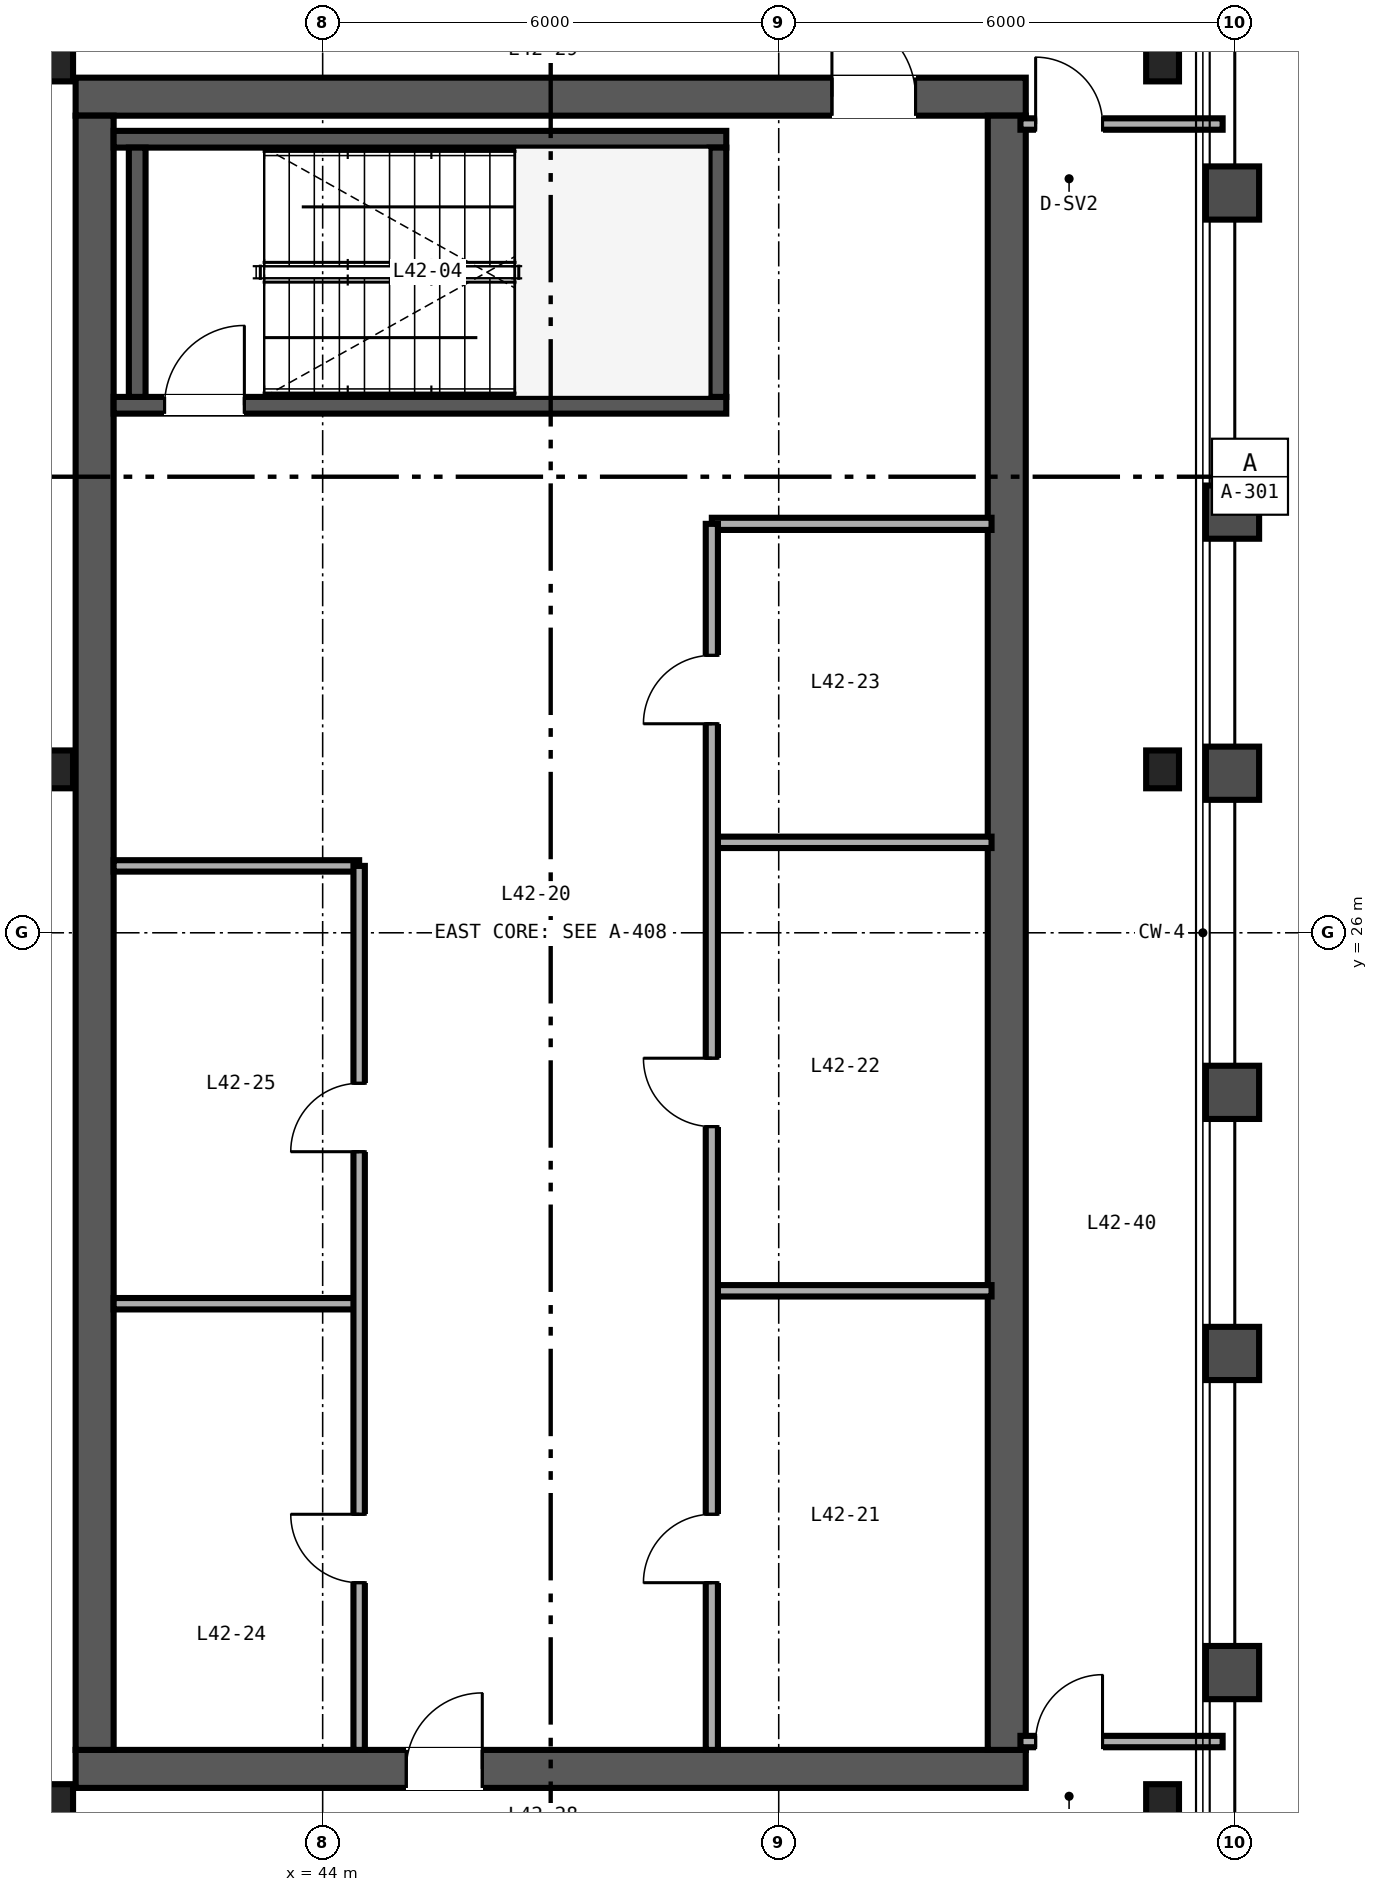
"""IFC4 building model, lengths in metres.
Left out: names, types, materials, properties, quantities, classifications, styles, units other than length and angle.
Written with IfcOpenShell. Run it as: python <this file> out.ifc"""

import sys

from ifc_helpers import new_model, si_unit, direction, frame, frame_2d, origin, origin_2d, place, context, subcontext, project, spatial, rectangle, i_section, extrude, source, transform, mapped, element, fill, save


model = new_model("IFC4")
c1 = context("Model", 3, precision=1e-05, world=origin(), true_north=direction((0.0, 1.0)))
c2 = subcontext(c1, "Body", "Model", "MODEL_VIEW")
j1 = project(units=[si_unit("LENGTHUNIT", "METRE"), si_unit("PLANEANGLEUNIT", "RADIAN")], contexts=[c1])
p1 = place(None, origin())
s1 = spatial("IfcSite", under=j1, at=p1, CompositionType="ELEMENT")
p2 = place(p1, origin())
s2 = spatial("IfcBuilding", under=s1, at=p2, CompositionType="ELEMENT")
p3 = place(p2, frame((0.0, 0.0, 170.4)))
s3 = spatial("IfcBuildingStorey", under=s2, at=p3, CompositionType="ELEMENT", Elevation=170.4)
p4 = place(p3, frame((40.75, 15.0, 0.0), z_axis=(0.0, 0.0, 1.0), x_axis=(1.0, 0.0, 0.0)))
e1 = element("IfcWall", 1, at=p4, inside=s3, PredefinedType="SHEAR", context=c2, shape_type="SweptSolid", body=[
    extrude(rectangle(XDim=12.5, YDim=0.5, at=frame_2d((6.25, 0.0))), origin(), (0.0, 0.0, 1.0), 3.37),
])
p5 = place(p4, frame((4.35, 0.0, 0.0)))
e2 = element("IfcOpeningElement", 2, at=p5, cuts=e1, PredefinedType="OPENING", context=c2, shape_type="SweptSolid", body=[
    extrude(rectangle(XDim=1.0, YDim=2.15, at=frame_2d((0.5, 1.075))), frame((0.0, 0.26, 0.0), z_axis=(0.0, -1.0, 0.0), x_axis=(1.0, 0.0, 0.0)), (0.0, 0.0, 1.0), 0.52),
])
p6 = place(p3, frame((40.75, 37.0, 0.0), z_axis=(0.0, 0.0, 1.0), x_axis=(1.0, 0.0, 0.0)))
e3 = element("IfcWall", 3, at=p6, inside=s3, PredefinedType="SHEAR", context=c2, shape_type="SweptSolid", body=[
    extrude(rectangle(XDim=12.5, YDim=0.5, at=frame_2d((6.25, 0.0))), origin(), (0.0, 0.0, 1.0), 3.37),
])
p7 = place(p6, frame((9.95, 0.0, 0.0)))
e4 = element("IfcOpeningElement", 4, at=p7, cuts=e3, PredefinedType="OPENING", context=c2, shape_type="SweptSolid", body=[
    extrude(rectangle(XDim=1.1, YDim=2.15, at=frame_2d((0.55, 1.075))), frame((0.0, 0.26, 0.0), z_axis=(0.0, -1.0, 0.0), x_axis=(1.0, 0.0, 0.0)), (0.0, 0.0, 1.0), 0.52),
])
for number, where, z_axis, x_axis in (
    (5, (41.0, 15.25, 0.0), (0.0, 0.0, 1.0), (0.0, 1.0, 0.0)),
    (6, (53.0, 15.25, 0.0), (0.0, 0.0, 1.0), (0.0, 1.0, 0.0)),
):
    element("IfcWall", number, at=place(p3, frame(where, z_axis=z_axis, x_axis=x_axis)), inside=s3, PredefinedType="SHEAR", context=c2, shape_type="SweptSolid", body=[
        extrude(rectangle(XDim=21.5, YDim=0.5, at=frame_2d((10.75, 0.0))), origin(), (0.0, 0.0, 1.0), 3.37),
    ])
p8 = place(p3, frame((41.25, 32.94, 0.0), z_axis=(0.0, 0.0, 1.0), x_axis=(1.0, 0.0, 0.0)))
e7 = element("IfcWall", 7, at=p8, inside=s3, PredefinedType="SHEAR", context=c2, shape_type="SweptSolid", body=[
    extrude(rectangle(XDim=8.06, YDim=0.22, at=frame_2d((4.03, 0.0))), origin(), (0.0, 0.0, 1.0), 3.4),
])
p9 = place(p8, frame((0.67, 0.0, 0.0)))
e8 = element("IfcOpeningElement", 8, at=p9, cuts=e7, PredefinedType="OPENING", context=c2, shape_type="SweptSolid", body=[
    extrude(rectangle(XDim=1.05, YDim=2.15, at=frame_2d((0.525, 1.075))), frame((0.0, 0.12, 0.0), z_axis=(0.0, -1.0, 0.0), x_axis=(1.0, 0.0, 0.0)), (0.0, 0.0, 1.0), 0.24),
])
p10 = place(p3, frame((41.25, 36.44, 0.0), z_axis=(0.0, 0.0, 1.0), x_axis=(1.0, 0.0, 0.0)))
e9 = element("IfcWall", 9, at=p10, inside=s3, PredefinedType="SHEAR", context=c2, shape_type="SweptSolid", body=[
    extrude(rectangle(XDim=8.06, YDim=0.22, at=frame_2d((4.03, 0.0))), origin(), (0.0, 0.0, 1.0), 3.4),
])
for number, where, z_axis, x_axis in (
    (10, (41.56, 33.05, 0.0), (0.0, 0.0, 1.0), (0.0, 1.0, 0.0)),
    (11, (49.2, 33.05, 0.0), (0.0, 0.0, 1.0), (0.0, 1.0, 0.0)),
):
    element("IfcWall", number, at=place(p3, frame(where, z_axis=z_axis, x_axis=x_axis)), inside=s3, PredefinedType="SHEAR", context=c2, shape_type="SweptSolid", body=[
        extrude(rectangle(XDim=3.28, YDim=0.22, at=frame_2d((1.64, 0.0))), origin(), (0.0, 0.0, 1.0), 3.4),
    ])
m1 = source(origin(), c2, "Body", "SweptSolid", [
    extrude(i_section(OverallWidth=0.432, OverallDepth=0.498, WebThickness=0.056, FlangeThickness=0.089, FilletRadius=0.025, at=origin_2d()), origin(), (0.0, 0.0, 1.0), 3.37),
])
for number, where, z_axis, x_axis in (
    (12, (40.5, 14.55, 0.0), (0.0, 0.0, 1.0), (1.0, 0.0, 0.0)),
    (13, (55.05, 14.55, 0.0), (0.0, 0.0, 1.0), (1.0, 0.0, 0.0)),
    (14, (40.5, 28.15, 0.0), (0.0, 0.0, 1.0), (1.0, 0.0, 0.0)),
    (15, (55.05, 28.15, 0.0), (0.0, 0.0, 1.0), (1.0, 0.0, 0.0)),
    (16, (40.5, 37.45, 0.0), (0.0, 0.0, 1.0), (1.0, 0.0, 0.0)),
    (17, (55.05, 37.45, 0.0), (0.0, 0.0, 1.0), (1.0, 0.0, 0.0)),
):
    element("IfcColumn", number, at=place(p3, frame(where, z_axis=z_axis, x_axis=x_axis)), inside=s3, PredefinedType="COLUMN", context=c2, shape_type="MappedRepresentation", body=[
        mapped(m1, transform((0.0, 0.0, 0.0), scale=1.0)),
    ])
p11 = place(p3, frame((49.12, 31.38, 0.0), z_axis=(0.0, 0.0, 1.0), x_axis=(1.0, 0.0, 0.0)))
e18 = element("IfcWall", 18, at=p11, inside=s3, PredefinedType="PARTITIONING", context=c2, shape_type="SweptSolid", body=[
    extrude(rectangle(XDim=3.68, YDim=0.16, at=frame_2d((1.84, 0.0))), origin(), (0.0, 0.0, 1.0), 2.47),
])
for number, where, z_axis, x_axis in (
    (19, (49.12, 21.29, 0.0), (0.0, 0.0, 1.0), (1.0, 0.0, 0.0)),
    (20, (49.12, 27.19, 0.0), (0.0, 0.0, 1.0), (1.0, 0.0, 0.0)),
):
    element("IfcWall", number, at=place(p3, frame(where, z_axis=z_axis, x_axis=x_axis)), inside=s3, PredefinedType="PARTITIONING", context=c2, shape_type="SweptSolid", body=[
        extrude(rectangle(XDim=3.68, YDim=0.15, at=frame_2d((1.84, 0.0))), origin(), (0.0, 0.0, 1.0), 3.37),
    ])
p12 = place(p3, frame((49.12, 15.25, 0.0), z_axis=(0.0, 0.0, 1.0), x_axis=(0.0, 1.0, 0.0)))
e21 = element("IfcWall", 21, at=p12, inside=s3, PredefinedType="PARTITIONING", context=c2, shape_type="SweptSolid", body=[
    extrude(rectangle(XDim=16.13, YDim=0.16, at=frame_2d((8.065, 0.0))), origin(), (0.0, 0.0, 1.0), 2.443),
])
p13 = place(p12, frame((2.2, 0.0, 0.0)))
e22 = element("IfcOpeningElement", 22, at=p13, cuts=e21, PredefinedType="OPENING", context=c2, shape_type="SweptSolid", body=[
    extrude(rectangle(XDim=0.9, YDim=2.15, at=frame_2d((0.45, 1.075))), frame((0.0, 0.09, 0.0), z_axis=(0.0, -1.0, 0.0), x_axis=(1.0, 0.0, 0.0)), (0.0, 0.0, 1.0), 0.18),
])
p14 = place(p12, frame((8.2, 0.0, 0.0)))
e23 = element("IfcOpeningElement", 23, at=p14, cuts=e21, PredefinedType="OPENING", context=c2, shape_type="SweptSolid", body=[
    extrude(rectangle(XDim=0.9, YDim=2.15, at=frame_2d((0.45, 1.075))), frame((0.0, 0.09, 0.0), z_axis=(0.0, -1.0, 0.0), x_axis=(1.0, 0.0, 0.0)), (0.0, 0.0, 1.0), 0.18),
])
p15 = place(p12, frame((13.5, 0.0, 0.0)))
e24 = element("IfcOpeningElement", 24, at=p15, cuts=e21, PredefinedType="OPENING", context=c2, shape_type="SweptSolid", body=[
    extrude(rectangle(XDim=0.9, YDim=2.15, at=frame_2d((0.45, 1.075))), frame((0.0, 0.09, 0.0), z_axis=(0.0, -1.0, 0.0), x_axis=(1.0, 0.0, 0.0)), (0.0, 0.0, 1.0), 0.18),
])
for number, where, z_axis, x_axis in (
    (25, (41.25, 26.88, 0.0), (0.0, 0.0, 1.0), (1.0, 0.0, 0.0)),
    (26, (41.25, 21.12, 0.0), (0.0, 0.0, 1.0), (1.0, 0.0, 0.0)),
):
    element("IfcWall", number, at=place(p3, frame(where, z_axis=z_axis, x_axis=x_axis)), inside=s3, PredefinedType="PARTITIONING", context=c2, shape_type="SweptSolid", body=[
        extrude(rectangle(XDim=3.23, YDim=0.15, at=frame_2d((1.615, 0.0))), origin(), (0.0, 0.0, 1.0), 3.37),
    ])
p16 = place(p3, frame((44.48, 15.25, 0.0), z_axis=(0.0, 0.0, 1.0), x_axis=(0.0, 1.0, 0.0)))
e27 = element("IfcWall", 27, at=p16, inside=s3, PredefinedType="PARTITIONING", context=c2, shape_type="SweptSolid", body=[
    extrude(rectangle(XDim=11.63, YDim=0.15, at=frame_2d((5.815, 0.0))), origin(), (0.0, 0.0, 1.0), 3.37),
])
p17 = place(p16, frame((2.2, 0.0, 0.0)))
e28 = element("IfcOpeningElement", 28, at=p17, cuts=e27, PredefinedType="OPENING", context=c2, shape_type="SweptSolid", body=[
    extrude(rectangle(XDim=0.9, YDim=2.15, at=frame_2d((0.45, 1.075))), frame((0.0, 0.085, 0.0), z_axis=(0.0, -1.0, 0.0), x_axis=(1.0, 0.0, 0.0)), (0.0, 0.0, 1.0), 0.17),
])
p18 = place(p16, frame((7.87, 0.0, 0.0)))
e29 = element("IfcOpeningElement", 29, at=p18, cuts=e27, PredefinedType="OPENING", context=c2, shape_type="SweptSolid", body=[
    extrude(rectangle(XDim=0.9, YDim=2.15, at=frame_2d((0.45, 1.075))), frame((0.0, 0.085, 0.0), z_axis=(0.0, -1.0, 0.0), x_axis=(1.0, 0.0, 0.0)), (0.0, 0.0, 1.0), 0.17),
])
p19 = place(p3, frame((53.18, 15.36, 0.0), z_axis=(0.0, 0.0, 1.0), x_axis=(1.0, 0.0, 0.0)))
e30 = element("IfcWall", 30, at=p19, inside=s3, PredefinedType="PARTITIONING", context=c2, shape_type="SweptSolid", body=[
    extrude(rectangle(XDim=2.66, YDim=0.15, at=frame_2d((1.33, 0.0))), origin(), (0.0, 0.0, 1.0), 2.591),
])
p20 = place(p19, frame((0.2, 0.0, 0.0)))
e31 = element("IfcOpeningElement", 31, at=p20, cuts=e30, PredefinedType="OPENING", context=c2, shape_type="SweptSolid", body=[
    extrude(rectangle(XDim=0.88, YDim=2.15, at=frame_2d((0.44, 1.075))), frame((0.0, 0.085, 0.0), z_axis=(0.0, -1.0, 0.0), x_axis=(1.0, 0.0, 0.0)), (0.0, 0.0, 1.0), 0.17),
])
p21 = place(p3, frame((53.18, 36.64, 0.0), z_axis=(0.0, 0.0, 1.0), x_axis=(1.0, 0.0, 0.0)))
e32 = element("IfcWall", 32, at=p21, inside=s3, PredefinedType="PARTITIONING", context=c2, shape_type="SweptSolid", body=[
    extrude(rectangle(XDim=2.66, YDim=0.15, at=frame_2d((1.33, 0.0))), origin(), (0.0, 0.0, 1.0), 2.753),
])
p22 = place(p21, frame((0.2, 0.0, 0.0)))
e33 = element("IfcOpeningElement", 33, at=p22, cuts=e32, PredefinedType="OPENING", context=c2, shape_type="SweptSolid", body=[
    extrude(rectangle(XDim=0.88, YDim=2.15, at=frame_2d((0.44, 1.075))), frame((0.0, 0.085, 0.0), z_axis=(0.0, -1.0, 0.0), x_axis=(1.0, 0.0, 0.0)), (0.0, 0.0, 1.0), 0.17),
])
m2 = source(origin(), c2, "Body", "SweptSolid", [
    extrude(rectangle(XDim=1.05, YDim=2.15, at=frame_2d((0.525, 1.075))), frame((0.0, 0.025, 0.0), z_axis=(0.0, -1.0, 0.0), x_axis=(1.0, 0.0, 0.0)), (0.0, 0.0, 1.0), 0.05),
])
p23 = place(p9, origin())
e34 = element("IfcDoor", 34, at=p23, inside=s3, OperationType="SINGLE_SWING_RIGHT", PredefinedType="DOOR", context=c2, shape_type="MappedRepresentation", body=[
    mapped(m2, transform((0.0, 0.0, 0.0), scale=1.0)),
])
fill(e8, e34)
m3 = source(origin(), c2, "Body", "SweptSolid", [
    extrude(rectangle(XDim=1.0, YDim=2.15, at=frame_2d((0.5, 1.075))), frame((0.0, 0.025, 0.0), z_axis=(0.0, -1.0, 0.0), x_axis=(1.0, 0.0, 0.0)), (0.0, 0.0, 1.0), 0.05),
])
p24 = place(p5, origin())
e35 = element("IfcDoor", 35, at=p24, inside=s3, OperationType="SINGLE_SWING_RIGHT", PredefinedType="DOOR", context=c2, shape_type="MappedRepresentation", body=[
    mapped(m3, transform((0.0, 0.0, 0.0), scale=1.0)),
])
fill(e2, e35)
m4 = source(origin(), c2, "Body", "SweptSolid", [
    extrude(rectangle(XDim=1.1, YDim=2.15, at=frame_2d((0.55, 1.075))), frame((0.0, 0.025, 0.0), z_axis=(0.0, -1.0, 0.0), x_axis=(1.0, 0.0, 0.0)), (0.0, 0.0, 1.0), 0.05),
])
p25 = place(p7, origin())
e36 = element("IfcDoor", 36, at=p25, inside=s3, OperationType="SINGLE_SWING_LEFT", PredefinedType="DOOR", context=c2, shape_type="MappedRepresentation", body=[
    mapped(m4, transform((0.0, 0.0, 0.0), scale=1.0)),
])
fill(e4, e36)
m5 = source(origin(), c2, "Body", "SweptSolid", [
    extrude(rectangle(XDim=0.9, YDim=2.15, at=frame_2d((0.45, 1.075))), frame((0.0, 0.025, 0.0), z_axis=(0.0, -1.0, 0.0), x_axis=(1.0, 0.0, 0.0)), (0.0, 0.0, 1.0), 0.05),
])
p26 = place(p13, origin())
e37 = element("IfcDoor", 37, at=p26, inside=s3, OperationType="SINGLE_SWING_LEFT", PredefinedType="DOOR", context=c2, shape_type="MappedRepresentation", body=[
    mapped(m5, transform((0.0, 0.0, 0.0), scale=1.0)),
])
fill(e22, e37)
p27 = place(p14, origin())
e38 = element("IfcDoor", 38, at=p27, inside=s3, OperationType="SINGLE_SWING_RIGHT", PredefinedType="DOOR", context=c2, shape_type="MappedRepresentation", body=[
    mapped(m5, transform((0.0, 0.0, 0.0), scale=1.0)),
])
fill(e23, e38)
p28 = place(p15, origin())
e39 = element("IfcDoor", 39, at=p28, inside=s3, OperationType="SINGLE_SWING_LEFT", PredefinedType="DOOR", context=c2, shape_type="MappedRepresentation", body=[
    mapped(m5, transform((0.0, 0.0, 0.0), scale=1.0)),
])
fill(e24, e39)
p29 = place(p17, origin())
e40 = element("IfcDoor", 40, at=p29, inside=s3, OperationType="SINGLE_SWING_RIGHT", PredefinedType="DOOR", context=c2, shape_type="MappedRepresentation", body=[
    mapped(m5, transform((0.0, 0.0, 0.0), scale=1.0)),
])
fill(e28, e40)
p30 = place(p18, origin())
e41 = element("IfcDoor", 41, at=p30, inside=s3, OperationType="SINGLE_SWING_LEFT", PredefinedType="DOOR", context=c2, shape_type="MappedRepresentation", body=[
    mapped(m5, transform((0.0, 0.0, 0.0), scale=1.0)),
])
fill(e29, e41)
m6 = source(origin(), c2, "Body", "SweptSolid", [
    extrude(rectangle(XDim=0.88, YDim=2.15, at=frame_2d((0.44, 1.075))), frame((0.0, 0.025, 0.0), z_axis=(0.0, -1.0, 0.0), x_axis=(1.0, 0.0, 0.0)), (0.0, 0.0, 1.0), 0.05),
])
p31 = place(p20, origin())
e42 = element("IfcDoor", 42, at=p31, inside=s3, OperationType="SINGLE_SWING_RIGHT", PredefinedType="DOOR", context=c2, shape_type="MappedRepresentation", body=[
    mapped(m6, transform((0.0, 0.0, 0.0), scale=1.0)),
])
fill(e31, e42)
p32 = place(p22, origin())
e43 = element("IfcDoor", 43, at=p32, inside=s3, OperationType="SINGLE_SWING_LEFT", PredefinedType="DOOR", context=c2, shape_type="MappedRepresentation", body=[
    mapped(m6, transform((0.0, 0.0, 0.0), scale=1.0)),
])
fill(e33, e43)
save(model, sys.argv[1])
